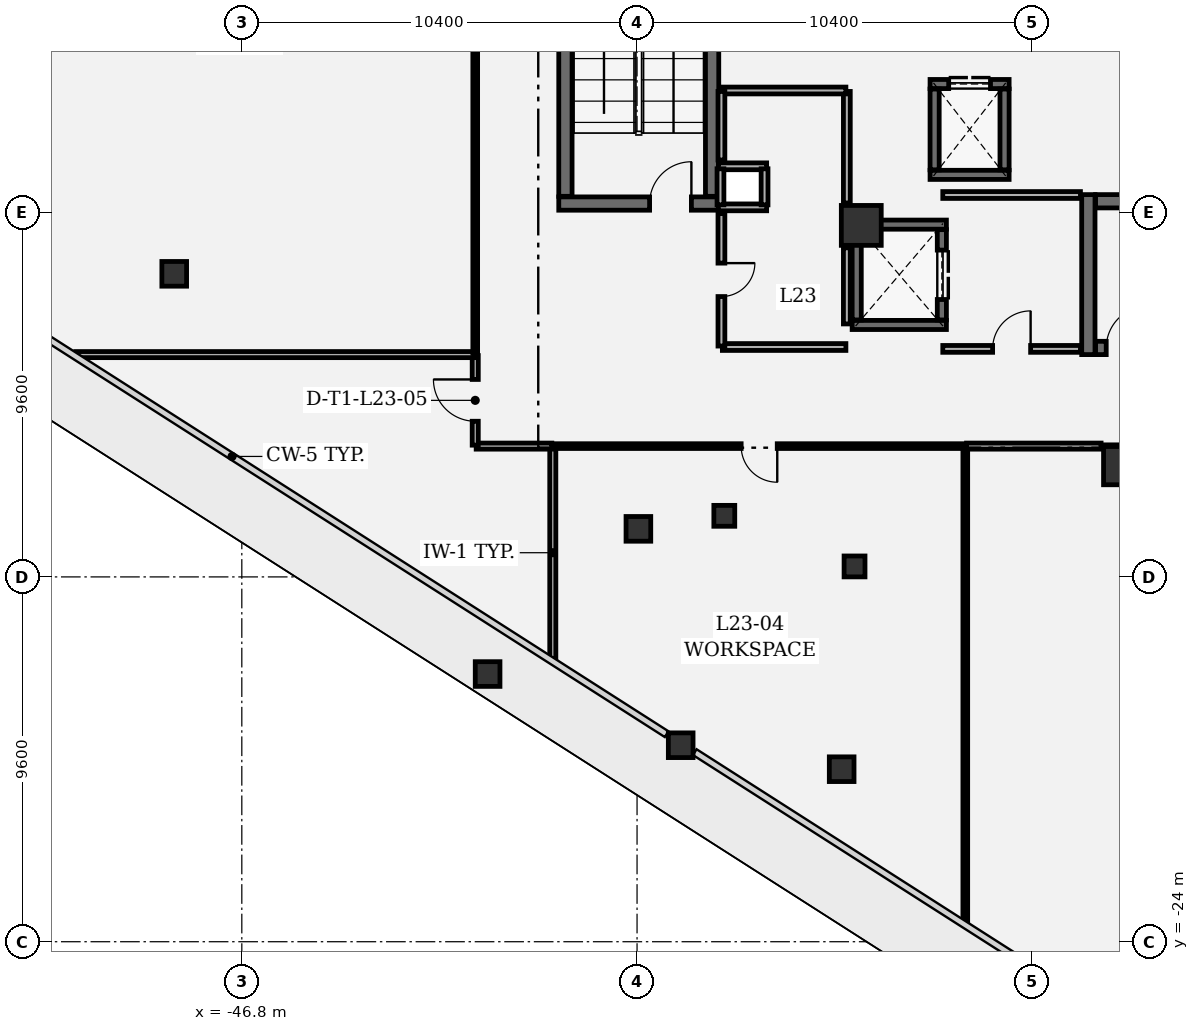
"""IFC4 building model, lengths in metres.
Left out: names, types, materials, properties, quantities, classifications, styles, units other than length and angle.
Written with IfcOpenShell. Run it as: python <this file> out.ifc"""

import sys

from ifc_helpers import new_model, si_unit, direction, frame, frame_2d, origin, origin_2d, place, context, subcontext, project, spatial, rectangle, extrude, element, fill, save


model = new_model("IFC4")
c1 = context("Model", 3, precision=1e-05, world=origin(), true_north=direction((0.0, 1.0)))
c2 = subcontext(c1, "Body", "Model", "MODEL_VIEW")
j1 = project(units=[si_unit("LENGTHUNIT", "METRE"), si_unit("PLANEANGLEUNIT", "RADIAN")], contexts=[c1])
p1 = place(None, origin())
s1 = spatial("IfcSite", under=j1, at=p1, CompositionType="ELEMENT")
p2 = place(p1, origin())
s2 = spatial("IfcBuilding", under=s1, at=p2, CompositionType="ELEMENT")
p3 = place(p2, frame((0.0, 0.0, 105.0)))
s3 = spatial("IfcBuildingStorey", under=s2, at=p3, CompositionType="ELEMENT", Elevation=105.0)
for number, where, z_axis, x_axis in (
    (1, (-23.6, -11.45, 0.0), (0.0, 0.0, 1.0), (1.0, 0.0, 0.0)),
    (2, (-30.5, -5.15, 0.0), (0.0, 0.0, 1.0), (1.0, 0.0, 0.0)),
):
    element("IfcColumn", number, at=place(p3, frame(where, z_axis=z_axis, x_axis=x_axis)), inside=s3, PredefinedType="COLUMN", context=c2, shape_type="SweptSolid", body=[
        extrude(rectangle(XDim=1.05, YDim=1.05, at=origin_2d()), origin(), (0.0, 0.0, 1.0), 4.8),
    ])
for number, where, z_axis, x_axis in (
    (3, (-40.333, -16.956, 0.0), (0.0, 0.0, 1.0), (1.0, 0.0, 0.0)),
    (4, (-35.252, -18.829, 0.0), (0.0, 0.0, 1.0), (1.0, 0.0, 0.0)),
    (5, (-31.016, -19.46, 0.0), (0.0, 0.0, 1.0), (1.0, 0.0, 0.0)),
    (6, (-48.578, -6.425, 0.0), (0.0, 0.0, 1.0), (1.0, 0.0, 0.0)),
    (7, (-36.365, -13.135, 0.0), (0.0, 0.0, 1.0), (1.0, 0.0, 0.0)),
):
    element("IfcColumn", number, at=place(p3, frame(where, z_axis=z_axis, x_axis=x_axis)), inside=s3, PredefinedType="COLUMN", context=c2, shape_type="SweptSolid", body=[
        extrude(rectangle(XDim=0.65, YDim=0.65, at=origin_2d()), origin(), (0.0, 0.0, 1.0), 4.8),
    ])
for number, where, z_axis, x_axis in (
    (8, (-34.104, -12.792, 0.0), (0.0, 0.0, 1.0), (1.0, 0.0, 0.0)),
    (9, (-30.677, -14.124, 0.0), (0.0, 0.0, 1.0), (1.0, 0.0, 0.0)),
):
    element("IfcColumn", number, at=place(p3, frame(where, z_axis=z_axis, x_axis=x_axis)), inside=s3, PredefinedType="COLUMN", context=c2, shape_type="SweptSolid", body=[
        extrude(rectangle(XDim=0.55, YDim=0.55, at=origin_2d()), origin(), (0.0, 0.0, 1.0), 4.8),
    ])
p4 = place(p3, frame((-24.525, -4.34, 0.0), z_axis=(0.0, 0.0, 1.0), x_axis=(0.0, -1.0, 0.0)))
e10 = element("IfcWall", 10, at=p4, inside=s3, PredefinedType="SHEAR", context=c2, shape_type="SweptSolid", body=[
    extrude(rectangle(XDim=4.21, YDim=0.35, at=frame_2d((2.105, 0.0))), origin(), (0.0, 0.0, 1.0), 4.52),
])
p5 = place(p3, frame((-24.335, -8.375, 0.0), z_axis=(0.0, 0.0, 1.0), x_axis=(1.0, 0.0, 0.0)))
e11 = element("IfcWall", 11, at=p5, inside=s3, PredefinedType="SHEAR", context=c2, shape_type="SweptSolid", body=[
    extrude(rectangle(XDim=8.12, YDim=0.35, at=frame_2d((4.06, 0.0))), origin(), (0.0, 0.0, 1.0), 4.52),
])
p6 = place(p5, frame((0.28, 0.0, 0.0)))
e12 = element("IfcOpeningElement", 12, at=p6, cuts=e11, PredefinedType="OPENING", context=c2, shape_type="SweptSolid", body=[
    extrude(rectangle(XDim=1.1, YDim=2.2, at=frame_2d((0.55, 1.1))), frame((0.0, 0.185, 0.0), z_axis=(0.0, -1.0, 0.0), x_axis=(1.0, 0.0, 0.0)), (0.0, 0.0, 1.0), 0.37),
])
p7 = place(p3, frame((-16.215, -4.515, 0.0), z_axis=(0.0, 0.0, 1.0), x_axis=(-1.0, 0.0, 0.0)))
e13 = element("IfcWall", 13, at=p7, inside=s3, PredefinedType="SHEAR", context=c2, shape_type="SweptSolid", body=[
    extrude(rectangle(XDim=8.12, YDim=0.35, at=frame_2d((4.06, 0.0))), origin(), (0.0, 0.0, 1.0), 4.52),
])
p8 = place(p3, frame((-38.46, -4.575, 0.0), z_axis=(0.0, 0.0, 1.0), x_axis=(1.0, 0.0, 0.0)))
e14 = element("IfcWall", 14, at=p8, inside=s3, PredefinedType="SHEAR", context=c2, shape_type="SweptSolid", body=[
    extrude(rectangle(XDim=4.21, YDim=0.35, at=frame_2d((2.105, 0.0))), origin(), (0.0, 0.0, 1.0), 4.52),
])
p9 = place(p8, frame((2.39, 0.0, 0.0)))
e15 = element("IfcOpeningElement", 15, at=p9, cuts=e14, PredefinedType="OPENING", context=c2, shape_type="SweptSolid", body=[
    extrude(rectangle(XDim=1.1, YDim=2.2, at=frame_2d((0.55, 1.1))), frame((0.0, 0.185, 0.0), z_axis=(0.0, -1.0, 0.0), x_axis=(1.0, 0.0, 0.0)), (0.0, 0.0, 1.0), 0.37),
])
for number, where, z_axis, x_axis in (
    (16, (-34.425, -4.385, 0.0), (0.0, 0.0, 1.0), (0.0, 1.0, 0.0)),
    (17, (-38.285, 4.385, 0.0), (0.0, 0.0, 1.0), (0.0, -1.0, 0.0)),
):
    element("IfcWall", number, at=place(p3, frame(where, z_axis=z_axis, x_axis=x_axis)), inside=s3, PredefinedType="SHEAR", context=c2, shape_type="SweptSolid", body=[
        extrude(rectangle(XDim=8.77, YDim=0.35, at=frame_2d((4.385, 0.0))), origin(), (0.0, 0.0, 1.0), 4.52),
    ])
for number, where, z_axis, x_axis in (
    (18, (-28.26, -7.77, 0.0), (0.0, 0.0, 1.0), (-1.0, 0.0, 0.0)),
    (19, (-30.74, -5.13, 0.0), (0.0, 0.0, 1.0), (1.0, 0.0, 0.0)),
):
    element("IfcWall", number, at=place(p3, frame(where, z_axis=z_axis, x_axis=x_axis)), inside=s3, PredefinedType="SHEAR", context=c2, shape_type="SweptSolid", body=[
        extrude(rectangle(XDim=2.48, YDim=0.24, at=frame_2d((1.24, 0.0))), origin(), (0.0, 0.0, 1.0), 4.52),
    ])
p10 = place(p3, frame((-30.62, -7.638, 0.0), z_axis=(0.0, 0.0, 1.0), x_axis=(0.0, 1.0, 0.0)))
e20 = element("IfcWall", 20, at=p10, inside=s3, PredefinedType="SHEAR", context=c2, shape_type="SweptSolid", body=[
    extrude(rectangle(XDim=2.376, YDim=0.24, at=frame_2d((1.188, 0.0))), origin(), (0.0, 0.0, 1.0), 4.52),
])
p11 = place(p3, frame((-28.38, -5.262, 0.0), z_axis=(0.0, 0.0, 1.0), x_axis=(0.0, -1.0, 0.0)))
e21 = element("IfcWall", 21, at=p11, inside=s3, PredefinedType="SHEAR", context=c2, shape_type="SweptSolid", body=[
    extrude(rectangle(XDim=2.376, YDim=0.24, at=frame_2d((1.188, 0.0))), origin(), (0.0, 0.0, 1.0), 4.52),
])
p12 = place(p11, frame((0.538, 0.0, 0.0)))
e22 = element("IfcOpeningElement", 22, at=p12, cuts=e21, PredefinedType="OPENING", context=c2, shape_type="SweptSolid", body=[
    extrude(rectangle(XDim=1.3, YDim=2.3, at=frame_2d((0.65, 1.15))), frame((0.0, 0.13, 0.0), z_axis=(0.0, -1.0, 0.0), x_axis=(1.0, 0.0, 0.0)), (0.0, 0.0, 1.0), 0.26),
])
p13 = place(p3, frame((-26.61, -3.82, 0.0), z_axis=(0.0, 0.0, 1.0), x_axis=(-1.0, 0.0, 0.0)))
e23 = element("IfcWall", 23, at=p13, inside=s3, PredefinedType="SHEAR", context=c2, shape_type="SweptSolid", body=[
    extrude(rectangle(XDim=2.08, YDim=0.24, at=frame_2d((1.04, 0.0))), origin(), (0.0, 0.0, 1.0), 4.52),
])
p14 = place(p3, frame((-28.69, -1.43, 0.0), z_axis=(0.0, 0.0, 1.0), x_axis=(1.0, 0.0, 0.0)))
e24 = element("IfcWall", 24, at=p14, inside=s3, PredefinedType="SHEAR", context=c2, shape_type="SweptSolid", body=[
    extrude(rectangle(XDim=2.08, YDim=0.24, at=frame_2d((1.04, 0.0))), origin(), (0.0, 0.0, 1.0), 4.52),
])
p15 = place(p14, frame((0.49, 0.0, 0.0)))
e25 = element("IfcOpeningElement", 25, at=p15, cuts=e24, PredefinedType="OPENING", context=c2, shape_type="SweptSolid", body=[
    extrude(rectangle(XDim=1.1, YDim=2.2, at=frame_2d((0.55, 1.1))), frame((0.0, 0.13, 0.0), z_axis=(0.0, -1.0, 0.0), x_axis=(1.0, 0.0, 0.0)), (0.0, 0.0, 1.0), 0.26),
])
for number, where, z_axis, x_axis in (
    (26, (-28.57, -3.688, 0.0), (0.0, 0.0, 1.0), (0.0, 1.0, 0.0)),
    (27, (-26.73, -1.562, 0.0), (0.0, 0.0, 1.0), (0.0, -1.0, 0.0)),
):
    element("IfcWall", number, at=place(p3, frame(where, z_axis=z_axis, x_axis=x_axis)), inside=s3, PredefinedType="SHEAR", context=c2, shape_type="SweptSolid", body=[
        extrude(rectangle(XDim=2.126, YDim=0.24, at=frame_2d((1.063, 0.0))), origin(), (0.0, 0.0, 1.0), 4.52),
    ])
for number, where, z_axis, x_axis in (
    (28, (-32.99, -4.675, 0.0), (0.0, 0.0, 1.0), (-1.0, 0.0, 0.0)),
    (29, (-34.26, -3.595, 0.0), (0.0, 0.0, 1.0), (1.0, 0.0, 0.0)),
):
    element("IfcWall", number, at=place(p3, frame(where, z_axis=z_axis, x_axis=x_axis)), inside=s3, PredefinedType="PARTITIONING", context=c2, shape_type="SweptSolid", body=[
        extrude(rectangle(XDim=1.27, YDim=0.18, at=frame_2d((0.635, 0.0))), origin(), (0.0, 0.0, 1.0), 4.52),
    ])
for number, where, z_axis, x_axis in (
    (30, (-34.205, -4.61, 0.0), (0.0, 0.0, 1.0), (0.0, 1.0, 0.0)),
    (31, (-33.045, -3.66, 0.0), (0.0, 0.0, 1.0), (0.0, -1.0, 0.0)),
):
    element("IfcWall", number, at=place(p3, frame(where, z_axis=z_axis, x_axis=x_axis)), inside=s3, PredefinedType="PARTITIONING", context=c2, shape_type="SweptSolid", body=[
        extrude(rectangle(XDim=0.95, YDim=0.18, at=frame_2d((0.475, 0.0))), origin(), (0.0, 0.0, 1.0), 4.52),
    ])
p16 = place(p3, frame((-28.355, -8.4, 0.0), z_axis=(0.0, 0.0, 1.0), x_axis=(1.0, 0.0, 0.0)))
e32 = element("IfcWall", 32, at=p16, inside=s3, PredefinedType="PARTITIONING", context=c2, shape_type="SweptSolid", body=[
    extrude(rectangle(XDim=3.622, YDim=0.18, at=frame_2d((1.811, 0.0))), origin(), (0.0, 0.0, 1.0), 4.52),
])
p17 = place(p16, frame((1.311, 0.0, 0.0)))
e33 = element("IfcOpeningElement", 33, at=p17, cuts=e32, PredefinedType="OPENING", context=c2, shape_type="SweptSolid", body=[
    extrude(rectangle(XDim=1.0, YDim=2.15, at=frame_2d((0.5, 1.075))), frame((0.0, 0.1, 0.0), z_axis=(0.0, -1.0, 0.0), x_axis=(1.0, 0.0, 0.0)), (0.0, 0.0, 1.0), 0.2),
])
p18 = place(p3, frame((-24.733, -4.35, 0.0), z_axis=(0.0, 0.0, 1.0), x_axis=(-1.0, 0.0, 0.0)))
e34 = element("IfcWall", 34, at=p18, inside=s3, PredefinedType="PARTITIONING", context=c2, shape_type="SweptSolid", body=[
    extrude(rectangle(XDim=3.622, YDim=0.18, at=frame_2d((1.811, 0.0))), origin(), (0.0, 0.0, 1.0), 4.52),
])
p19 = place(p3, frame((-34.155, -8.35, 0.0), z_axis=(0.0, 0.0, 1.0), x_axis=(1.0, 0.0, 0.0)))
e35 = element("IfcWall", 35, at=p19, inside=s3, PredefinedType="PARTITIONING", context=c2, shape_type="SweptSolid", body=[
    extrude(rectangle(XDim=3.25, YDim=0.18, at=frame_2d((1.625, 0.0))), origin(), (0.0, 0.0, 1.0), 4.52),
])
p20 = place(p3, frame((-30.88, -7.743, 0.0), z_axis=(0.0, 0.0, 1.0), x_axis=(0.0, 1.0, 0.0)))
e36 = element("IfcWall", 36, at=p20, inside=s3, PredefinedType="PARTITIONING", context=c2, shape_type="SweptSolid", body=[
    extrude(rectangle(XDim=2.003, YDim=0.18, at=frame_2d((1.001, 0.0))), origin(), (0.0, 0.0, 1.0), 4.52),
])
p21 = place(p3, frame((-30.88, -4.56, 0.0), z_axis=(0.0, 0.0, 1.0), x_axis=(0.0, 1.0, 0.0)))
e37 = element("IfcWall", 37, at=p21, inside=s3, PredefinedType="PARTITIONING", context=c2, shape_type="SweptSolid", body=[
    extrude(rectangle(XDim=2.935, YDim=0.18, at=frame_2d((1.468, 0.0))), origin(), (0.0, 0.0, 1.0), 4.52),
])
p22 = place(p3, frame((-30.905, -1.6, 0.0), z_axis=(0.0, 0.0, 1.0), x_axis=(-1.0, 0.0, 0.0)))
e38 = element("IfcWall", 38, at=p22, inside=s3, PredefinedType="PARTITIONING", context=c2, shape_type="SweptSolid", body=[
    extrude(rectangle(XDim=3.25, YDim=0.18, at=frame_2d((1.625, 0.0))), origin(), (0.0, 0.0, 1.0), 4.52),
])
p23 = place(p3, frame((-34.18, -1.625, 0.0), z_axis=(0.0, 0.0, 1.0), x_axis=(0.0, -1.0, 0.0)))
e39 = element("IfcWall", 39, at=p23, inside=s3, PredefinedType="PARTITIONING", context=c2, shape_type="SweptSolid", body=[
    extrude(rectangle(XDim=1.805, YDim=0.18, at=frame_2d((0.902, 0.0))), origin(), (0.0, 0.0, 1.0), 4.52),
])
p24 = place(p3, frame((-34.18, -4.84, 0.0), z_axis=(0.0, 0.0, 1.0), x_axis=(0.0, -1.0, 0.0)))
e40 = element("IfcWall", 40, at=p24, inside=s3, PredefinedType="PARTITIONING", context=c2, shape_type="SweptSolid", body=[
    extrude(rectangle(XDim=3.485, YDim=0.18, at=frame_2d((1.743, 0.0))), origin(), (0.0, 0.0, 1.0), 4.52),
])
p25 = place(p24, frame((1.302, 0.0, 0.0)))
e41 = element("IfcOpeningElement", 41, at=p25, cuts=e40, PredefinedType="OPENING", context=c2, shape_type="SweptSolid", body=[
    extrude(rectangle(XDim=0.88, YDim=2.1, at=frame_2d((0.44, 1.05))), frame((0.0, 0.1, 0.0), z_axis=(0.0, -1.0, 0.0), x_axis=(1.0, 0.0, 0.0)), (0.0, 0.0, 1.0), 0.2),
])
p26 = place(p3, frame((-38.617, -16.544, 0.0), z_axis=(0.0, 0.0, 1.0), x_axis=(0.0, 1.0, 0.0)))
e42 = element("IfcWall", 42, at=p26, inside=s3, PredefinedType="PARTITIONING", context=c2, shape_type="SweptSolid", body=[
    extrude(rectangle(XDim=5.561, YDim=0.16, at=frame_2d((2.78, 0.0))), origin(), (0.0, 0.0, 1.0), 4.52),
])
p27 = place(p3, frame((-38.642, -10.958, 0.0), z_axis=(0.0, 0.0, 1.0), x_axis=(-1.0, 0.0, 0.0)))
e43 = element("IfcWall", 43, at=p27, inside=s3, PredefinedType="PARTITIONING", context=c2, shape_type="SweptSolid", body=[
    extrude(rectangle(XDim=1.991, YDim=0.16, at=frame_2d((0.996, 0.0))), origin(), (0.0, 0.0, 1.0), 3.64),
])
p28 = place(p3, frame((-40.658, -10.933, 0.0), z_axis=(0.0, 0.0, 1.0), x_axis=(0.0, 1.0, 0.0)))
e44 = element("IfcWall", 44, at=p28, inside=s3, PredefinedType="PARTITIONING", context=c2, shape_type="SweptSolid", body=[
    extrude(rectangle(XDim=2.358, YDim=0.16, at=frame_2d((1.179, 0.0))), origin(), (0.0, 0.0, 1.0), 4.52),
])
p29 = place(p28, frame((0.629, 0.0, 0.0)))
e45 = element("IfcOpeningElement", 45, at=p29, cuts=e44, PredefinedType="OPENING", context=c2, shape_type="SweptSolid", body=[
    extrude(rectangle(XDim=1.1, YDim=2.15, at=frame_2d((0.55, 1.075))), frame((0.0, 0.09, 0.0), z_axis=(0.0, -1.0, 0.0), x_axis=(1.0, 0.0, 0.0)), (0.0, 0.0, 1.0), 0.18),
])
p30 = place(p3, frame((-40.683, -8.55, 0.0), z_axis=(0.0, 0.0, 1.0), x_axis=(-1.0, 0.0, 0.0)))
e46 = element("IfcWall", 46, at=p30, inside=s3, PredefinedType="PARTITIONING", context=c2, shape_type="SweptSolid", body=[
    extrude(rectangle(XDim=10.487, YDim=0.16, at=frame_2d((5.243, 0.0))), origin(), (0.0, 0.0, 1.0), 3.64),
])
p31 = place(p3, frame((-27.763, -23.481, 0.0), z_axis=(0.0, 0.0, 1.0), x_axis=(0.0, 1.0, 0.0)))
e47 = element("IfcWall", 47, at=p31, inside=s3, PredefinedType="PARTITIONING", context=c2, shape_type="SweptSolid", body=[
    extrude(rectangle(XDim=12.498, YDim=0.125, at=frame_2d((6.249, 0.0))), origin(), (0.0, 0.0, 1.0), 4.084),
])
p32 = place(p3, frame((-27.788, -10.958, 0.0), z_axis=(0.0, 0.0, 1.0), x_axis=(-1.0, 0.0, 0.0)))
e48 = element("IfcWall", 48, at=p32, inside=s3, PredefinedType="PARTITIONING", context=c2, shape_type="SweptSolid", body=[
    extrude(rectangle(XDim=10.796, YDim=0.125, at=frame_2d((5.398, 0.0))), origin(), (0.0, 0.0, 1.0), 4.084),
])
p33 = place(p32, frame((4.923, 0.0, 0.0)))
e49 = element("IfcOpeningElement", 49, at=p33, cuts=e48, PredefinedType="OPENING", context=c2, shape_type="SweptSolid", body=[
    extrude(rectangle(XDim=0.95, YDim=2.15, at=frame_2d((0.475, 1.075))), frame((0.0, 0.073, 0.0), z_axis=(0.0, -1.0, 0.0), x_axis=(1.0, 0.0, 0.0)), (0.0, 0.0, 1.0), 0.145),
])
p34 = place(p3, frame((-24.19, -10.958, 0.0), z_axis=(0.0, 0.0, 1.0), x_axis=(-1.0, 0.0, 0.0)))
e50 = element("IfcWall", 50, at=p34, inside=s3, PredefinedType="PARTITIONING", context=c2, shape_type="SweptSolid", body=[
    extrude(rectangle(XDim=3.54, YDim=0.16, at=frame_2d((1.77, 0.0))), origin(), (0.0, 0.0, 1.0), 4.52),
])
p35 = place(p3, frame((-40.658, -8.517, 0.0), z_axis=(0.0, 0.0, 1.0), x_axis=(0.0, 1.0, 0.0)))
e51 = element("IfcWall", 51, at=p35, inside=s3, PredefinedType="PARTITIONING", context=c2, shape_type="SweptSolid", body=[
    extrude(rectangle(XDim=16.834, YDim=0.125, at=frame_2d((8.417, 0.0))), origin(), (0.0, 0.0, 1.0), 4.52),
])
p36 = place(p35, frame((7.942, 0.0, 0.0)))
e52 = element("IfcOpeningElement", 52, at=p36, cuts=e51, PredefinedType="OPENING", context=c2, shape_type="SweptSolid", body=[
    extrude(rectangle(XDim=0.95, YDim=2.15, at=frame_2d((0.475, 1.075))), frame((0.0, 0.073, 0.0), z_axis=(0.0, -1.0, 0.0), x_axis=(1.0, 0.0, 0.0)), (0.0, 0.0, 1.0), 0.145),
])
p37 = place(p6, origin())
e53 = element("IfcDoor", 53, at=p37, inside=s3, OperationType="SINGLE_SWING_RIGHT", PredefinedType="DOOR", context=c2, shape_type="SweptSolid", body=[
    extrude(rectangle(XDim=1.1, YDim=2.2, at=frame_2d((0.55, 1.1))), frame((0.0, 0.025, 0.0), z_axis=(0.0, -1.0, 0.0), x_axis=(1.0, 0.0, 0.0)), (0.0, 0.0, 1.0), 0.05),
])
fill(e12, e53)
p38 = place(p9, origin())
e54 = element("IfcDoor", 54, at=p38, inside=s3, OperationType="SINGLE_SWING_RIGHT", PredefinedType="DOOR", context=c2, shape_type="SweptSolid", body=[
    extrude(rectangle(XDim=1.1, YDim=2.2, at=frame_2d((0.55, 1.1))), frame((0.0, 0.025, 0.0), z_axis=(0.0, -1.0, 0.0), x_axis=(1.0, 0.0, 0.0)), (0.0, 0.0, 1.0), 0.05),
])
fill(e15, e54)
p39 = place(p12, origin())
e55 = element("IfcDoor", 55, at=p39, inside=s3, OperationType="DOUBLE_DOOR_SLIDING", PredefinedType="DOOR", context=c2, shape_type="SweptSolid", body=[
    extrude(rectangle(XDim=1.3, YDim=2.3, at=frame_2d((0.65, 1.15))), frame((0.0, 0.025, 0.0), z_axis=(0.0, -1.0, 0.0), x_axis=(1.0, 0.0, 0.0)), (0.0, 0.0, 1.0), 0.05),
])
fill(e22, e55)
p40 = place(p15, origin())
e56 = element("IfcDoor", 56, at=p40, inside=s3, OperationType="DOUBLE_DOOR_SLIDING", PredefinedType="DOOR", context=c2, shape_type="SweptSolid", body=[
    extrude(rectangle(XDim=1.1, YDim=2.2, at=frame_2d((0.55, 1.1))), frame((0.0, 0.025, 0.0), z_axis=(0.0, -1.0, 0.0), x_axis=(1.0, 0.0, 0.0)), (0.0, 0.0, 1.0), 0.05),
])
fill(e25, e56)
p41 = place(p25, origin())
e57 = element("IfcDoor", 57, at=p41, inside=s3, OperationType="SINGLE_SWING_LEFT", PredefinedType="DOOR", context=c2, shape_type="SweptSolid", body=[
    extrude(rectangle(XDim=0.88, YDim=2.1, at=frame_2d((0.44, 1.05))), frame((0.0, 0.025, 0.0), z_axis=(0.0, -1.0, 0.0), x_axis=(1.0, 0.0, 0.0)), (0.0, 0.0, 1.0), 0.05),
])
fill(e41, e57)
p42 = place(p29, origin())
e58 = element("IfcDoor", 58, at=p42, inside=s3, OperationType="SINGLE_SWING_RIGHT", PredefinedType="DOOR", context=c2, shape_type="SweptSolid", body=[
    extrude(rectangle(XDim=1.1, YDim=2.15, at=frame_2d((0.55, 1.075))), frame((0.0, 0.025, 0.0), z_axis=(0.0, -1.0, 0.0), x_axis=(1.0, 0.0, 0.0)), (0.0, 0.0, 1.0), 0.05),
])
fill(e45, e58)
p43 = place(p33, origin())
e59 = element("IfcDoor", 59, at=p43, inside=s3, OperationType="SINGLE_SWING_LEFT", PredefinedType="DOOR", context=c2, shape_type="SweptSolid", body=[
    extrude(rectangle(XDim=0.95, YDim=2.15, at=frame_2d((0.475, 1.075))), frame((0.0, 0.025, 0.0), z_axis=(0.0, -1.0, 0.0), x_axis=(1.0, 0.0, 0.0)), (0.0, 0.0, 1.0), 0.05),
])
fill(e49, e59)
p44 = place(p17, origin())
e60 = element("IfcDoor", 60, at=p44, inside=s3, OperationType="SINGLE_SWING_RIGHT", PredefinedType="DOOR", context=c2, shape_type="SweptSolid", body=[
    extrude(rectangle(XDim=1.0, YDim=2.15, at=frame_2d((0.5, 1.075))), frame((0.0, 0.025, 0.0), z_axis=(0.0, -1.0, 0.0), x_axis=(1.0, 0.0, 0.0)), (0.0, 0.0, 1.0), 0.05),
])
fill(e33, e60)
save(model, sys.argv[1])
